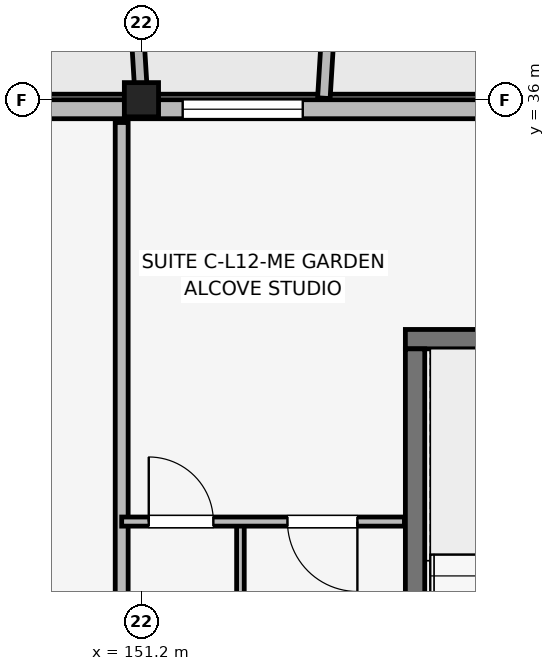
"""IFC4 building model, lengths in metres.
Left out: names, types, materials, properties, quantities, classifications, styles, units other than length and angle.
Written with IfcOpenShell. Run it as: python <this file> out.ifc"""

import sys

from ifc_helpers import new_model, si_unit, direction, frame, frame_2d, origin, origin_2d, place, context, subcontext, project, spatial, rectangle, extrude, element, fill, save


model = new_model("IFC4")
c1 = context("Model", 3, precision=1e-05, world=origin(), true_north=direction((0.0, 1.0)))
c2 = subcontext(c1, "Body", "Model", "MODEL_VIEW")
j1 = project(units=[si_unit("LENGTHUNIT", "METRE"), si_unit("PLANEANGLEUNIT", "RADIAN")], contexts=[c1])
p1 = place(None, origin())
s1 = spatial("IfcSite", under=j1, at=p1, CompositionType="ELEMENT")
p2 = place(p1, origin())
s2 = spatial("IfcBuilding", under=s1, at=p2, CompositionType="ELEMENT")
p3 = place(p2, frame((0.0, 0.0, 40.2)))
s3 = spatial("IfcBuildingStorey", under=s2, at=p3, CompositionType="ELEMENT", Elevation=40.2)
p4 = place(p3, frame((151.2, 36.0, 0.0), z_axis=(0.0, 0.0, 1.0), x_axis=(1.0, 0.0, 0.0)))
e1 = element("IfcColumn", 1, at=p4, inside=s3, PredefinedType="COLUMN", context=c2, shape_type="SweptSolid", body=[
    extrude(rectangle(XDim=0.45, YDim=0.45, at=origin_2d()), origin(), (0.0, 0.0, 1.0), 3.15),
])
p5 = place(p3, frame((154.673, 32.85, 0.0), z_axis=(0.0, 0.0, 1.0), x_axis=(1.0, 0.0, 0.0)))
e2 = element("IfcWall", 2, at=p5, inside=s3, PredefinedType="SHEAR", context=c2, shape_type="SweptSolid", body=[
    extrude(rectangle(XDim=3.305, YDim=0.255, at=frame_2d((1.652, 0.0))), origin(), (0.0, 0.0, 1.0), 3.15),
])
p6 = place(p3, frame((154.8, 26.427, 0.0), z_axis=(0.0, 0.0, 1.0), x_axis=(0.0, 1.0, 0.0)))
e3 = element("IfcWall", 3, at=p6, inside=s3, PredefinedType="SHEAR", context=c2, shape_type="SweptSolid", body=[
    extrude(rectangle(XDim=6.295, YDim=0.255, at=frame_2d((3.147, 0.0))), origin(), (0.0, 0.0, 1.0), 3.15),
])
p7 = place(p3, frame((162.6, 35.875, 0.0), z_axis=(0.0, 0.0, 1.0), x_axis=(-1.0, 0.0, 0.0)))
e4 = element("IfcWall", 4, at=p7, inside=s3, PredefinedType="SOLIDWALL", context=c2, shape_type="SweptSolid", body=[
    extrude(rectangle(XDim=30.0, YDim=0.25, at=frame_2d((15.0, 0.0))), origin(), (0.0, 0.0, 1.0), 2.48),
])
p8 = place(p7, frame((27.95, 0.0, 0.0), z_axis=(0.0, 0.0, 1.0), x_axis=(-1.0, 0.0, 0.0)))
e5 = element("IfcOpeningElement", 5, at=p8, cuts=e4, PredefinedType="OPENING", context=c2, shape_type="SweptSolid", body=[
    extrude(rectangle(XDim=1.5, YDim=2.15, at=frame_2d((0.75, 1.075))), frame((0.0, 0.135, 0.0), z_axis=(0.0, -1.0, 0.0), x_axis=(1.0, 0.0, 0.0)), (0.0, 0.0, 1.0), 0.27),
])
p9 = place(p7, frame((3.55, 0.0, 0.0), z_axis=(0.0, 0.0, 1.0), x_axis=(-1.0, 0.0, 0.0)))
e6 = element("IfcOpeningElement", 6, at=p9, cuts=e4, PredefinedType="OPENING", context=c2, shape_type="SweptSolid", body=[
    extrude(rectangle(XDim=1.5, YDim=2.15, at=frame_2d((0.75, 1.075))), frame((0.0, 0.135, 0.0), z_axis=(0.0, -1.0, 0.0), x_axis=(1.0, 0.0, 0.0)), (0.0, 0.0, 1.0), 0.27),
])
p10 = place(p7, frame((14.625, 0.0, 0.5)))
e7 = element("IfcOpeningElement", 7, at=p10, cuts=e4, PredefinedType="OPENING", context=c2, shape_type="SweptSolid", body=[
    extrude(rectangle(XDim=0.75, YDim=1.75, at=frame_2d((0.375, 0.875))), frame((0.0, 0.135, 0.0), z_axis=(0.0, -1.0, 0.0), x_axis=(1.0, 0.0, 0.0)), (0.0, 0.0, 1.0), 0.27),
])
p11 = place(p7, frame((9.278, 0.0, 0.7)))
e8 = element("IfcOpeningElement", 8, at=p11, cuts=e4, PredefinedType="OPENING", context=c2, shape_type="SweptSolid", body=[
    extrude(rectangle(XDim=1.58, YDim=1.6, at=frame_2d((0.79, 0.8))), frame((0.0, 0.135, 0.0), z_axis=(0.0, -1.0, 0.0), x_axis=(1.0, 0.0, 0.0)), (0.0, 0.0, 1.0), 0.27),
])
p12 = place(p7, frame((19.073, 0.0, 0.7)))
e9 = element("IfcOpeningElement", 9, at=p12, cuts=e4, PredefinedType="OPENING", context=c2, shape_type="SweptSolid", body=[
    extrude(rectangle(XDim=1.72, YDim=1.6, at=frame_2d((0.86, 0.8))), frame((0.0, 0.135, 0.0), z_axis=(0.0, -1.0, 0.0), x_axis=(1.0, 0.0, 0.0)), (0.0, 0.0, 1.0), 0.27),
])
for number, where, z_axis, x_axis in (
    (10, (151.2, 36.02, 0.0), (0.0, 0.0, 1.0), (-0.061, 0.998, 0.0)),
    (11, (153.6, 36.02, 0.0), (0.0, 0.0, 1.0), (0.061, 0.998, 0.0)),
):
    element("IfcWall", number, at=place(p3, frame(where, z_axis=z_axis, x_axis=x_axis)), inside=s3, PredefinedType="ELEMENTEDWALL", context=c2, shape_type="SweptSolid", body=[
        extrude(rectangle(XDim=1.964, YDim=0.165, at=frame_2d((0.982, 0.0))), origin(), (0.0, 0.0, 1.0), 2.48),
    ])
p13 = place(p3, frame((150.94, 26.1, 0.0), z_axis=(0.0, 0.0, 1.0), x_axis=(0.0, 1.0, 0.0)))
e12 = element("IfcWall", 12, at=p13, inside=s3, PredefinedType="PARTITIONING", context=c2, shape_type="SweptSolid", body=[
    extrude(rectangle(XDim=9.6, YDim=0.17, at=frame_2d((4.8, 0.0))), origin(), (0.0, 0.0, 1.0), 2.38),
])
p14 = place(p3, frame((152.502, 26.1, 0.0), z_axis=(0.0, 0.0, 1.0), x_axis=(0.0, 1.0, 0.0)))
e13 = element("IfcWall", 13, at=p14, inside=s3, PredefinedType="PARTITIONING", context=c2, shape_type="SweptSolid", body=[
    extrude(rectangle(XDim=4.35, YDim=0.1, at=frame_2d((2.175, 0.0))), origin(), (0.0, 0.0, 1.0), 2.38),
])
p15 = place(p3, frame((150.94, 30.45, 0.0), z_axis=(0.0, 0.0, 1.0), x_axis=(1.0, 0.0, 0.0)))
e14 = element("IfcWall", 14, at=p15, inside=s3, PredefinedType="PARTITIONING", context=c2, shape_type="SweptSolid", body=[
    extrude(rectangle(XDim=3.72, YDim=0.12, at=frame_2d((1.86, 0.0))), origin(), (0.0, 0.0, 1.0), 2.38),
])
p16 = place(p15, frame((0.356, 0.0, 0.0)))
e15 = element("IfcOpeningElement", 15, at=p16, cuts=e14, PredefinedType="OPENING", context=c2, shape_type="SweptSolid", body=[
    extrude(rectangle(XDim=0.85, YDim=2.08, at=frame_2d((0.425, 1.04))), frame((0.0, 0.07, 0.0), z_axis=(0.0, -1.0, 0.0), x_axis=(1.0, 0.0, 0.0)), (0.0, 0.0, 1.0), 0.14),
])
p17 = place(p15, frame((3.101, 0.0, 0.0), z_axis=(0.0, 0.0, 1.0), x_axis=(-1.0, 0.0, 0.0)))
e16 = element("IfcOpeningElement", 16, at=p17, cuts=e14, PredefinedType="OPENING", context=c2, shape_type="SweptSolid", body=[
    extrude(rectangle(XDim=0.92, YDim=2.08, at=frame_2d((0.46, 1.04))), frame((0.0, 0.07, 0.0), z_axis=(0.0, -1.0, 0.0), x_axis=(1.0, 0.0, 0.0)), (0.0, 0.0, 1.0), 0.14),
])
p18 = place(p11, origin())
e17 = element("IfcWindow", 17, at=p18, inside=s3, PartitioningType="SINGLE_PANEL", PredefinedType="WINDOW", context=c2, shape_type="SweptSolid", body=[
    extrude(rectangle(XDim=1.58, YDim=1.6, at=frame_2d((0.79, 0.8))), frame((0.0, 0.03, 0.0), z_axis=(0.0, -1.0, 0.0), x_axis=(1.0, 0.0, 0.0)), (0.0, 0.0, 1.0), 0.06),
])
fill(e8, e17)
p19 = place(p16, origin())
e18 = element("IfcDoor", 18, at=p19, inside=s3, OperationType="SINGLE_SWING_LEFT", PredefinedType="DOOR", context=c2, shape_type="SweptSolid", body=[
    extrude(rectangle(XDim=0.85, YDim=2.08, at=frame_2d((0.425, 1.04))), frame((0.0, 0.025, 0.0), z_axis=(0.0, -1.0, 0.0), x_axis=(1.0, 0.0, 0.0)), (0.0, 0.0, 1.0), 0.05),
])
fill(e15, e18)
p20 = place(p17, origin())
e19 = element("IfcDoor", 19, at=p20, inside=s3, OperationType="SINGLE_SWING_RIGHT", PredefinedType="DOOR", context=c2, shape_type="SweptSolid", body=[
    extrude(rectangle(XDim=0.92, YDim=2.08, at=frame_2d((0.46, 1.04))), frame((0.0, 0.025, 0.0), z_axis=(0.0, -1.0, 0.0), x_axis=(1.0, 0.0, 0.0)), (0.0, 0.0, 1.0), 0.05),
])
fill(e16, e19)
save(model, sys.argv[1])
